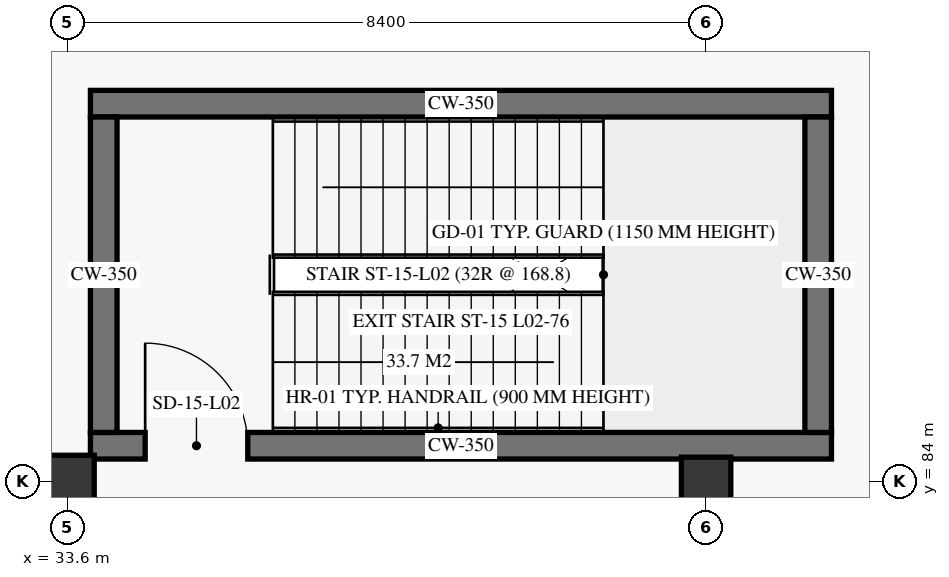
"""IFC4 building model, lengths in metres.
Left out: names, types, materials, properties, quantities, classifications, styles, units other than length and angle.
Written with IfcOpenShell. Run it as: python <this file> out.ifc"""

import sys

from ifc_helpers import new_model, si_unit, direction, frame, frame_2d, origin, origin_2d, place, context, subcontext, project, spatial, rectangle, extrude, element, fill, save


model = new_model("IFC4")
c1 = context("Model", 3, precision=1e-05, world=origin(), true_north=direction((0.0, 1.0)))
c2 = subcontext(c1, "Body", "Model", "MODEL_VIEW")
j1 = project(units=[si_unit("LENGTHUNIT", "METRE"), si_unit("PLANEANGLEUNIT", "RADIAN")], contexts=[c1])
p1 = place(None, origin())
s1 = spatial("IfcSite", under=j1, at=p1, CompositionType="ELEMENT")
p2 = place(p1, origin())
s2 = spatial("IfcBuilding", under=s1, at=p2, CompositionType="ELEMENT")
p3 = place(p2, frame((0.0, 0.0, 6.0)))
s3 = spatial("IfcBuildingStorey", under=s2, at=p3, CompositionType="ELEMENT", Elevation=6.0)
p4 = place(p3, frame((33.6, 84.0, 0.0), z_axis=(0.0, 0.0, 1.0), x_axis=(1.0, 0.0, 0.0)))
e1 = element("IfcColumn", 1, at=p4, inside=s3, PredefinedType="COLUMN", context=c2, shape_type="SweptSolid", body=[
    extrude(rectangle(XDim=0.7, YDim=0.7, at=origin_2d()), origin(), (0.0, 0.0, 1.0), 5.1),
])
p5 = place(p3, frame((42.0, 84.0, 0.0), z_axis=(0.0, 0.0, 1.0), x_axis=(1.0, 0.0, 0.0)))
e2 = element("IfcColumn", 2, at=p5, inside=s3, PredefinedType="COLUMN", context=c2, shape_type="SweptSolid", body=[
    extrude(rectangle(XDim=0.65, YDim=0.65, at=origin_2d()), origin(), (0.0, 0.0, 1.0), 5.1),
])
p6 = place(p3, frame((33.9, 84.475, 0.0), z_axis=(0.0, 0.0, 1.0), x_axis=(1.0, 0.0, 0.0)))
e3 = element("IfcWall", 3, at=p6, inside=s3, PredefinedType="SHEAR", context=c2, shape_type="SweptSolid", body=[
    extrude(rectangle(XDim=9.75, YDim=0.35, at=frame_2d((4.875, 0.0))), origin(), (0.0, 0.0, 1.0), 5.1),
])
p7 = place(p6, frame((0.72, 0.0, 0.0)))
e4 = element("IfcOpeningElement", 4, at=p7, cuts=e3, PredefinedType="OPENING", context=c2, shape_type="SweptSolid", body=[
    extrude(rectangle(XDim=1.35, YDim=2.25, at=frame_2d((0.675, 1.125))), frame((0.0, 0.185, 0.0), z_axis=(0.0, -1.0, 0.0), x_axis=(1.0, 0.0, 0.0)), (0.0, 0.0, 1.0), 0.37),
])
p8 = place(p3, frame((33.9, 88.975, 0.0), z_axis=(0.0, 0.0, 1.0), x_axis=(1.0, 0.0, 0.0)))
e5 = element("IfcWall", 5, at=p8, inside=s3, PredefinedType="SHEAR", context=c2, shape_type="SweptSolid", body=[
    extrude(rectangle(XDim=9.75, YDim=0.35, at=frame_2d((4.875, 0.0))), origin(), (0.0, 0.0, 1.0), 5.1),
])
for number, where, z_axis, x_axis in (
    (6, (34.075, 84.65, 0.0), (0.0, 0.0, 1.0), (0.0, 1.0, 0.0)),
    (7, (43.475, 84.65, 0.0), (0.0, 0.0, 1.0), (0.0, 1.0, 0.0)),
):
    element("IfcWall", number, at=place(p3, frame(where, z_axis=z_axis, x_axis=x_axis)), inside=s3, PredefinedType="SHEAR", context=c2, shape_type="SweptSolid", body=[
        extrude(rectangle(XDim=4.15, YDim=0.35, at=frame_2d((2.075, 0.0))), origin(), (0.0, 0.0, 1.0), 5.1),
    ])
p9 = place(p7, origin())
e8 = element("IfcDoor", 8, at=p9, inside=s3, OperationType="SINGLE_SWING_LEFT", PredefinedType="DOOR", context=c2, shape_type="SweptSolid", body=[
    extrude(rectangle(XDim=1.35, YDim=2.25, at=frame_2d((0.675, 1.125))), frame((0.0, 0.025, 0.0), z_axis=(0.0, -1.0, 0.0), x_axis=(1.0, 0.0, 0.0)), (0.0, 0.0, 1.0), 0.05),
])
fill(e4, e8)
save(model, sys.argv[1])
